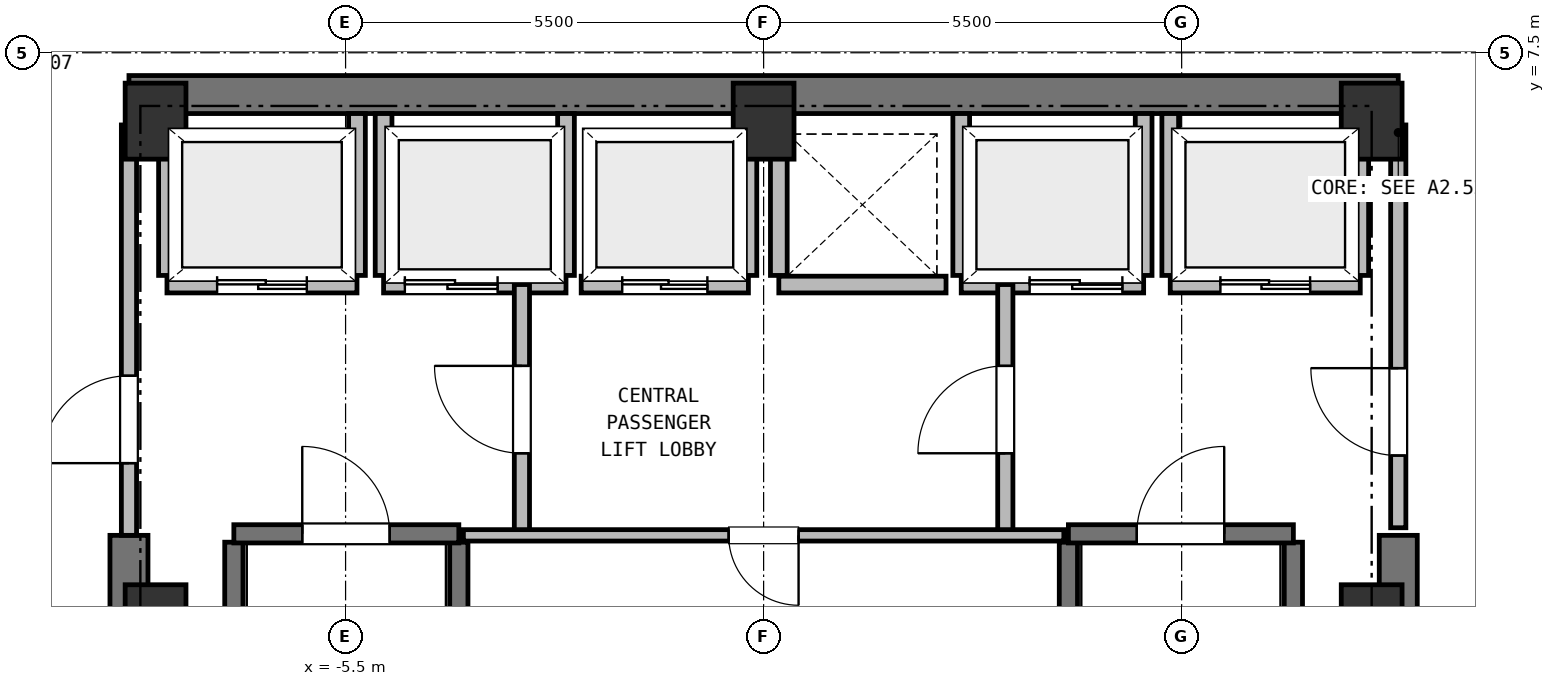
"""IFC4 building model, lengths in metres.
Left out: names, types, materials, properties, quantities, classifications, styles, units other than length and angle.
Written with IfcOpenShell. Run it as: python <this file> out.ifc"""

import sys

from ifc_helpers import new_model, si_unit, direction, frame, frame_2d, origin, origin_2d, place, context, subcontext, project, spatial, rectangle, extrude, element, fill, save


model = new_model("IFC4")
c1 = context("Model", 3, precision=1e-05, world=origin(), true_north=direction((0.0, 1.0)))
c2 = subcontext(c1, "Body", "Model", "MODEL_VIEW")
j1 = project(units=[si_unit("LENGTHUNIT", "METRE"), si_unit("PLANEANGLEUNIT", "RADIAN")], contexts=[c1])
p1 = place(None, origin())
s1 = spatial("IfcSite", under=j1, at=p1, CompositionType="ELEMENT")
p2 = place(p1, origin())
s2 = spatial("IfcBuilding", under=s1, at=p2, CompositionType="ELEMENT")
p3 = place(p2, frame((0.0, 0.0, 194.15)))
s3 = spatial("IfcBuildingStorey", under=s2, at=p3, CompositionType="ELEMENT", Elevation=194.15)
for number, where, z_axis, x_axis in (
    (1, (8.0, 0.0, 0.0), (0.0, 0.0, 1.0), (1.0, 0.0, 0.0)),
    (2, (8.0, 6.6, 0.0), (0.0, 0.0, 1.0), (1.0, 0.0, 0.0)),
    (3, (0.0, 6.6, 0.0), (0.0, 0.0, 1.0), (1.0, 0.0, 0.0)),
    (4, (-8.0, 6.6, 0.0), (0.0, 0.0, 1.0), (1.0, 0.0, 0.0)),
    (5, (-8.0, 0.0, 0.0), (0.0, 0.0, 1.0), (1.0, 0.0, 0.0)),
):
    element("IfcColumn", number, at=place(p3, frame(where, z_axis=z_axis, x_axis=x_axis)), inside=s3, PredefinedType="COLUMN", context=c2, shape_type="SweptSolid", body=[
        extrude(rectangle(XDim=0.8, YDim=1.0, at=origin_2d()), origin(), (0.0, 0.0, 1.0), 3.8),
    ])
p4 = place(p3, frame((-8.35, 6.95, 0.0), z_axis=(0.0, 0.0, 1.0), x_axis=(1.0, 0.0, 0.0)))
e6 = element("IfcWall", 6, at=p4, inside=s3, PredefinedType="SHEAR", context=c2, shape_type="SweptSolid", body=[
    extrude(rectangle(XDim=16.7, YDim=0.5, at=frame_2d((8.35, 0.0))), origin(), (0.0, 0.0, 1.0), 3.55),
])
for number, where, z_axis, x_axis in (
    (7, (-8.35, -6.95, 0.0), (0.0, 0.0, 1.0), (0.0, 1.0, 0.0)),
    (8, (8.35, -6.95, 0.0), (0.0, 0.0, 1.0), (0.0, 1.0, 0.0)),
):
    element("IfcWall", number, at=place(p3, frame(where, z_axis=z_axis, x_axis=x_axis)), inside=s3, PredefinedType="SHEAR", context=c2, shape_type="SweptSolid", body=[
        extrude(rectangle(XDim=8.1, YDim=0.5, at=frame_2d((4.05, 0.0))), origin(), (0.0, 0.0, 1.0), 3.55),
    ])
for number, where, z_axis, x_axis in (
    (9, (-6.97, -6.16, 0.0), (0.0, 0.0, 1.0), (0.0, 1.0, 0.0)),
    (10, (-4.01, -6.16, 0.0), (0.0, 0.0, 1.0), (0.0, 1.0, 0.0)),
):
    element("IfcWall", number, at=place(p3, frame(where, z_axis=z_axis, x_axis=x_axis)), inside=s3, PredefinedType="SHEAR", context=c2, shape_type="SweptSolid", body=[
        extrude(rectangle(XDim=7.22, YDim=0.24, at=frame_2d((3.61, 0.0))), origin(), (0.0, 0.0, 1.0), 3.55),
    ])
p5 = place(p3, frame((-6.97, 1.17, 0.0), z_axis=(0.0, 0.0, 1.0), x_axis=(1.0, 0.0, 0.0)))
e11 = element("IfcWall", 11, at=p5, inside=s3, PredefinedType="SHEAR", context=c2, shape_type="SweptSolid", body=[
    extrude(rectangle(XDim=2.96, YDim=0.24, at=frame_2d((1.48, 0.0))), origin(), (0.0, 0.0, 1.0), 3.55),
])
p6 = place(p5, frame((0.9, 0.0, 0.0)))
e12 = element("IfcOpeningElement", 12, at=p6, cuts=e11, PredefinedType="OPENING", context=c2, shape_type="SweptSolid", body=[
    extrude(rectangle(XDim=1.15, YDim=2.15, at=frame_2d((0.575, 1.075))), frame((0.0, 0.13, 0.0), z_axis=(0.0, -1.0, 0.0), x_axis=(1.0, 0.0, 0.0)), (0.0, 0.0, 1.0), 0.26),
])
for number, where, z_axis, x_axis in (
    (13, (4.01, -6.16, 0.0), (0.0, 0.0, 1.0), (0.0, 1.0, 0.0)),
    (14, (6.97, -6.16, 0.0), (0.0, 0.0, 1.0), (0.0, 1.0, 0.0)),
):
    element("IfcWall", number, at=place(p3, frame(where, z_axis=z_axis, x_axis=x_axis)), inside=s3, PredefinedType="SHEAR", context=c2, shape_type="SweptSolid", body=[
        extrude(rectangle(XDim=7.22, YDim=0.24, at=frame_2d((3.61, 0.0))), origin(), (0.0, 0.0, 1.0), 3.55),
    ])
p7 = place(p3, frame((4.01, 1.17, 0.0), z_axis=(0.0, 0.0, 1.0), x_axis=(1.0, 0.0, 0.0)))
e15 = element("IfcWall", 15, at=p7, inside=s3, PredefinedType="SHEAR", context=c2, shape_type="SweptSolid", body=[
    extrude(rectangle(XDim=2.96, YDim=0.24, at=frame_2d((1.48, 0.0))), origin(), (0.0, 0.0, 1.0), 3.55),
])
p8 = place(p7, frame((0.9, 0.0, 0.0)))
e16 = element("IfcOpeningElement", 16, at=p8, cuts=e15, PredefinedType="OPENING", context=c2, shape_type="SweptSolid", body=[
    extrude(rectangle(XDim=1.15, YDim=2.15, at=frame_2d((0.575, 1.075))), frame((0.0, 0.13, 0.0), z_axis=(0.0, -1.0, 0.0), x_axis=(1.0, 0.0, 0.0)), (0.0, 0.0, 1.0), 0.26),
])
p9 = place(p3, frame((-7.85, 4.45, 0.0), z_axis=(0.0, 0.0, 1.0), x_axis=(1.0, 0.0, 0.0)))
e17 = element("IfcWall", 17, at=p9, inside=s3, PredefinedType="PARTITIONING", context=c2, shape_type="SweptSolid", body=[
    extrude(rectangle(XDim=2.5, YDim=0.22, at=frame_2d((1.25, 0.0))), origin(), (0.0, 0.0, 1.0), 3.55),
])
p10 = place(p9, frame((0.66, 0.0, 0.0)))
e18 = element("IfcOpeningElement", 18, at=p10, cuts=e17, PredefinedType="OPENING", context=c2, shape_type="SweptSolid", body=[
    extrude(rectangle(XDim=1.18, YDim=2.15, at=frame_2d((0.59, 1.075))), frame((0.0, 0.12, 0.0), z_axis=(0.0, -1.0, 0.0), x_axis=(1.0, 0.0, 0.0)), (0.0, 0.0, 1.0), 0.24),
])
p11 = place(p3, frame((-7.85, 4.57, 0.0), z_axis=(0.0, 0.0, 1.0), x_axis=(0.0, 1.0, 0.0)))
e19 = element("IfcWall", 19, at=p11, inside=s3, PredefinedType="PARTITIONING", context=c2, shape_type="SweptSolid", body=[
    extrude(rectangle(XDim=2.13, YDim=0.22, at=frame_2d((1.065, 0.0))), origin(), (0.0, 0.0, 1.0), 3.18),
])
p12 = place(p3, frame((-5.35, 4.57, 0.0), z_axis=(0.0, 0.0, 1.0), x_axis=(0.0, 1.0, 0.0)))
e20 = element("IfcWall", 20, at=p12, inside=s3, PredefinedType="PARTITIONING", context=c2, shape_type="SweptSolid", body=[
    extrude(rectangle(XDim=2.13, YDim=0.22, at=frame_2d((1.065, 0.0))), origin(), (0.0, 0.0, 1.0), 3.55),
])
p13 = place(p3, frame((5.35, 4.45, 0.0), z_axis=(0.0, 0.0, 1.0), x_axis=(1.0, 0.0, 0.0)))
e21 = element("IfcWall", 21, at=p13, inside=s3, PredefinedType="PARTITIONING", context=c2, shape_type="SweptSolid", body=[
    extrude(rectangle(XDim=2.5, YDim=0.22, at=frame_2d((1.25, 0.0))), origin(), (0.0, 0.0, 1.0), 3.55),
])
p14 = place(p13, frame((0.66, 0.0, 0.0)))
e22 = element("IfcOpeningElement", 22, at=p14, cuts=e21, PredefinedType="OPENING", context=c2, shape_type="SweptSolid", body=[
    extrude(rectangle(XDim=1.18, YDim=2.15, at=frame_2d((0.59, 1.075))), frame((0.0, 0.12, 0.0), z_axis=(0.0, -1.0, 0.0), x_axis=(1.0, 0.0, 0.0)), (0.0, 0.0, 1.0), 0.24),
])
p15 = place(p3, frame((5.35, 4.57, 0.0), z_axis=(0.0, 0.0, 1.0), x_axis=(0.0, 1.0, 0.0)))
e23 = element("IfcWall", 23, at=p15, inside=s3, PredefinedType="PARTITIONING", context=c2, shape_type="SweptSolid", body=[
    extrude(rectangle(XDim=2.13, YDim=0.22, at=frame_2d((1.065, 0.0))), origin(), (0.0, 0.0, 1.0), 3.55),
])
p16 = place(p3, frame((7.85, 4.57, 0.0), z_axis=(0.0, 0.0, 1.0), x_axis=(0.0, 1.0, 0.0)))
e24 = element("IfcWall", 24, at=p16, inside=s3, PredefinedType="PARTITIONING", context=c2, shape_type="SweptSolid", body=[
    extrude(rectangle(XDim=2.13, YDim=0.22, at=frame_2d((1.065, 0.0))), origin(), (0.0, 0.0, 1.0), 3.18),
])
p17 = place(p3, frame((-5.0, 4.45, 0.0), z_axis=(0.0, 0.0, 1.0), x_axis=(1.0, 0.0, 0.0)))
e25 = element("IfcWall", 25, at=p17, inside=s3, PredefinedType="PARTITIONING", context=c2, shape_type="SweptSolid", body=[
    extrude(rectangle(XDim=2.4, YDim=0.22, at=frame_2d((1.2, 0.0))), origin(), (0.0, 0.0, 1.0), 3.55),
])
p18 = place(p17, frame((0.28, 0.0, 0.0)))
e26 = element("IfcOpeningElement", 26, at=p18, cuts=e25, PredefinedType="OPENING", context=c2, shape_type="SweptSolid", body=[
    extrude(rectangle(XDim=1.22, YDim=2.15, at=frame_2d((0.61, 1.075))), frame((0.0, 0.12, 0.0), z_axis=(0.0, -1.0, 0.0), x_axis=(1.0, 0.0, 0.0)), (0.0, 0.0, 1.0), 0.24),
])
for number, where, z_axis, x_axis in (
    (27, (-5.0, 4.57, 0.0), (0.0, 0.0, 1.0), (0.0, 1.0, 0.0)),
    (28, (-2.6, 4.57, 0.0), (0.0, 0.0, 1.0), (0.0, 1.0, 0.0)),
):
    element("IfcWall", number, at=place(p3, frame(where, z_axis=z_axis, x_axis=x_axis)), inside=s3, PredefinedType="PARTITIONING", context=c2, shape_type="SweptSolid", body=[
        extrude(rectangle(XDim=2.13, YDim=0.22, at=frame_2d((1.065, 0.0))), origin(), (0.0, 0.0, 1.0), 3.55),
    ])
p19 = place(p3, frame((2.6, 4.45, 0.0), z_axis=(0.0, 0.0, 1.0), x_axis=(1.0, 0.0, 0.0)))
e29 = element("IfcWall", 29, at=p19, inside=s3, PredefinedType="PARTITIONING", context=c2, shape_type="SweptSolid", body=[
    extrude(rectangle(XDim=2.4, YDim=0.22, at=frame_2d((1.2, 0.0))), origin(), (0.0, 0.0, 1.0), 3.55),
])
p20 = place(p19, frame((0.9, 0.0, 0.0)))
e30 = element("IfcOpeningElement", 30, at=p20, cuts=e29, PredefinedType="OPENING", context=c2, shape_type="SweptSolid", body=[
    extrude(rectangle(XDim=1.22, YDim=2.15, at=frame_2d((0.61, 1.075))), frame((0.0, 0.12, 0.0), z_axis=(0.0, -1.0, 0.0), x_axis=(1.0, 0.0, 0.0)), (0.0, 0.0, 1.0), 0.24),
])
for number, where, z_axis, x_axis in (
    (31, (2.6, 4.57, 0.0), (0.0, 0.0, 1.0), (0.0, 1.0, 0.0)),
    (32, (5.0, 4.57, 0.0), (0.0, 0.0, 1.0), (0.0, 1.0, 0.0)),
):
    element("IfcWall", number, at=place(p3, frame(where, z_axis=z_axis, x_axis=x_axis)), inside=s3, PredefinedType="PARTITIONING", context=c2, shape_type="SweptSolid", body=[
        extrude(rectangle(XDim=2.13, YDim=0.22, at=frame_2d((1.065, 0.0))), origin(), (0.0, 0.0, 1.0), 3.55),
    ])
p21 = place(p3, frame((-2.4, 4.45, 0.0), z_axis=(0.0, 0.0, 1.0), x_axis=(1.0, 0.0, 0.0)))
e33 = element("IfcWall", 33, at=p21, inside=s3, PredefinedType="PARTITIONING", context=c2, shape_type="SweptSolid", body=[
    extrude(rectangle(XDim=2.2, YDim=0.22, at=frame_2d((1.1, 0.0))), origin(), (0.0, 0.0, 1.0), 3.55),
])
p22 = place(p21, frame((0.54, 0.0, 0.0)))
e34 = element("IfcOpeningElement", 34, at=p22, cuts=e33, PredefinedType="OPENING", context=c2, shape_type="SweptSolid", body=[
    extrude(rectangle(XDim=1.12, YDim=2.15, at=frame_2d((0.56, 1.075))), frame((0.0, 0.12, 0.0), z_axis=(0.0, -1.0, 0.0), x_axis=(1.0, 0.0, 0.0)), (0.0, 0.0, 1.0), 0.24),
])
p23 = place(p3, frame((-0.2, 4.57, 0.0), z_axis=(0.0, 0.0, 1.0), x_axis=(0.0, 1.0, 0.0)))
e35 = element("IfcWall", 35, at=p23, inside=s3, PredefinedType="PARTITIONING", context=c2, shape_type="SweptSolid", body=[
    extrude(rectangle(XDim=2.13, YDim=0.22, at=frame_2d((1.065, 0.0))), origin(), (0.0, 0.0, 1.0), 3.55),
])
p24 = place(p3, frame((0.2, 4.45, 0.0), z_axis=(0.0, 0.0, 1.0), x_axis=(1.0, 0.0, 0.0)))
e36 = element("IfcWall", 36, at=p24, inside=s3, PredefinedType="PARTITIONING", context=c2, shape_type="SweptSolid", body=[
    extrude(rectangle(XDim=2.2, YDim=0.22, at=frame_2d((1.1, 0.0))), origin(), (0.0, 0.0, 1.0), 3.55),
])
p25 = place(p3, frame((0.2, 4.57, 0.0), z_axis=(0.0, 0.0, 1.0), x_axis=(0.0, 1.0, 0.0)))
e37 = element("IfcWall", 37, at=p25, inside=s3, PredefinedType="PARTITIONING", context=c2, shape_type="SweptSolid", body=[
    extrude(rectangle(XDim=2.13, YDim=0.22, at=frame_2d((1.065, 0.0))), origin(), (0.0, 0.0, 1.0), 3.55),
])
p26 = place(p3, frame((-3.18, 1.15, 0.0), z_axis=(0.0, 0.0, 1.0), x_axis=(0.0, 1.0, 0.0)))
e38 = element("IfcWall", 38, at=p26, inside=s3, PredefinedType="PARTITIONING", context=c2, shape_type="SweptSolid", body=[
    extrude(rectangle(XDim=3.3, YDim=0.2, at=frame_2d((1.65, 0.0))), origin(), (0.0, 0.0, 1.0), 3.55),
])
p27 = place(p26, frame((1.08, 0.0, 0.0)))
e39 = element("IfcOpeningElement", 39, at=p27, cuts=e38, PredefinedType="OPENING", context=c2, shape_type="SweptSolid", body=[
    extrude(rectangle(XDim=1.15, YDim=2.15, at=frame_2d((0.575, 1.075))), frame((0.0, 0.11, 0.0), z_axis=(0.0, -1.0, 0.0), x_axis=(1.0, 0.0, 0.0)), (0.0, 0.0, 1.0), 0.22),
])
p28 = place(p3, frame((3.18, 1.15, 0.0), z_axis=(0.0, 0.0, 1.0), x_axis=(0.0, 1.0, 0.0)))
e40 = element("IfcWall", 40, at=p28, inside=s3, PredefinedType="PARTITIONING", context=c2, shape_type="SweptSolid", body=[
    extrude(rectangle(XDim=3.3, YDim=0.2, at=frame_2d((1.65, 0.0))), origin(), (0.0, 0.0, 1.0), 3.55),
])
p29 = place(p28, frame((1.08, 0.0, 0.0)))
e41 = element("IfcOpeningElement", 41, at=p29, cuts=e40, PredefinedType="OPENING", context=c2, shape_type="SweptSolid", body=[
    extrude(rectangle(XDim=1.15, YDim=2.15, at=frame_2d((0.575, 1.075))), frame((0.0, 0.11, 0.0), z_axis=(0.0, -1.0, 0.0), x_axis=(1.0, 0.0, 0.0)), (0.0, 0.0, 1.0), 0.22),
])
p30 = place(p3, frame((-8.35, 1.15, 0.0), z_axis=(0.0, 0.0, 1.0), x_axis=(0.0, 1.0, 0.0)))
e42 = element("IfcWall", 42, at=p30, inside=s3, PredefinedType="PARTITIONING", context=c2, shape_type="SweptSolid", body=[
    extrude(rectangle(XDim=5.4, YDim=0.2, at=frame_2d((2.7, 0.0))), origin(), (0.0, 0.0, 1.0), 3.55),
])
p31 = place(p30, frame((0.95, 0.0, 0.0)))
e43 = element("IfcOpeningElement", 43, at=p31, cuts=e42, PredefinedType="OPENING", context=c2, shape_type="SweptSolid", body=[
    extrude(rectangle(XDim=1.15, YDim=2.15, at=frame_2d((0.575, 1.075))), frame((0.0, 0.11, 0.0), z_axis=(0.0, -1.0, 0.0), x_axis=(1.0, 0.0, 0.0)), (0.0, 0.0, 1.0), 0.22),
])
p32 = place(p3, frame((8.35, 1.25, 0.0), z_axis=(0.0, 0.0, 1.0), x_axis=(0.0, 1.0, 0.0)))
e44 = element("IfcWall", 44, at=p32, inside=s3, PredefinedType="PARTITIONING", context=c2, shape_type="SweptSolid", body=[
    extrude(rectangle(XDim=5.3, YDim=0.2, at=frame_2d((2.65, 0.0))), origin(), (0.0, 0.0, 1.0), 3.55),
])
p33 = place(p32, frame((0.95, 0.0, 0.0)))
e45 = element("IfcOpeningElement", 45, at=p33, cuts=e44, PredefinedType="OPENING", context=c2, shape_type="SweptSolid", body=[
    extrude(rectangle(XDim=1.15, YDim=2.15, at=frame_2d((0.575, 1.075))), frame((0.0, 0.11, 0.0), z_axis=(0.0, -1.0, 0.0), x_axis=(1.0, 0.0, 0.0)), (0.0, 0.0, 1.0), 0.22),
])
p34 = place(p3, frame((3.95, 1.15, 0.0), z_axis=(0.0, 0.0, 1.0), x_axis=(-1.0, 0.0, 0.0)))
e46 = element("IfcWall", 46, at=p34, inside=s3, PredefinedType="PARTITIONING", context=c2, shape_type="SweptSolid", body=[
    extrude(rectangle(XDim=7.9, YDim=0.15, at=frame_2d((3.95, 0.0))), origin(), (0.0, 0.0, 1.0), 3.55),
])
p35 = place(p34, frame((3.49, 0.0, 0.0)))
e47 = element("IfcOpeningElement", 47, at=p35, cuts=e46, PredefinedType="OPENING", context=c2, shape_type="SweptSolid", body=[
    extrude(rectangle(XDim=0.92, YDim=2.05, at=frame_2d((0.46, 1.025))), frame((0.0, 0.085, 0.0), z_axis=(0.0, -1.0, 0.0), x_axis=(1.0, 0.0, 0.0)), (0.0, 0.0, 1.0), 0.17),
])
p36 = place(p3, frame((8.648, 9.171, 0.0), z_axis=(0.0, 0.0, 1.0), x_axis=(0.689960858356, -0.723846678473, 0.0)))
e48 = element("IfcWall", 48, at=p36, inside=s3, PredefinedType="PARTITIONING", context=c2, shape_type="SweptSolid", body=[
    extrude(rectangle(XDim=2.572, YDim=0.15, at=frame_2d((1.286, 0.0))), origin(), (0.0, 0.0, 1.0), 3.55),
])
p37 = place(p3, frame((-10.422, 7.309, 0.0), z_axis=(0.0, 0.0, 1.0), x_axis=(0.689960858356, 0.723846678473, 0.0)))
e49 = element("IfcWall", 49, at=p37, inside=s3, PredefinedType="PARTITIONING", context=c2, shape_type="SweptSolid", body=[
    extrude(rectangle(XDim=2.572, YDim=0.15, at=frame_2d((1.286, 0.0))), origin(), (0.0, 0.0, 1.0), 3.55),
])
p38 = place(p37, frame((0.796, 0.0, 0.0)))
e50 = element("IfcOpeningElement", 50, at=p38, cuts=e49, PredefinedType="OPENING", context=c2, shape_type="SweptSolid", body=[
    extrude(rectangle(XDim=1.06, YDim=2.15, at=frame_2d((0.53, 1.075))), frame((0.0, 0.085, 0.0), z_axis=(0.0, -1.0, 0.0), x_axis=(1.0, 0.0, 0.0)), (0.0, 0.0, 1.0), 0.17),
])
p39 = place(p6, origin())
e51 = element("IfcDoor", 51, at=p39, inside=s3, OperationType="SINGLE_SWING_LEFT", PredefinedType="DOOR", context=c2, shape_type="SweptSolid", body=[
    extrude(rectangle(XDim=1.15, YDim=2.15, at=frame_2d((0.575, 1.075))), frame((0.0, 0.025, 0.0), z_axis=(0.0, -1.0, 0.0), x_axis=(1.0, 0.0, 0.0)), (0.0, 0.0, 1.0), 0.05),
])
fill(e12, e51)
p40 = place(p8, origin())
e52 = element("IfcDoor", 52, at=p40, inside=s3, OperationType="SINGLE_SWING_RIGHT", PredefinedType="DOOR", context=c2, shape_type="SweptSolid", body=[
    extrude(rectangle(XDim=1.15, YDim=2.15, at=frame_2d((0.575, 1.075))), frame((0.0, 0.025, 0.0), z_axis=(0.0, -1.0, 0.0), x_axis=(1.0, 0.0, 0.0)), (0.0, 0.0, 1.0), 0.05),
])
fill(e16, e52)
p41 = place(p10, origin())
e53 = element("IfcDoor", 53, at=p41, inside=s3, OperationType="DOUBLE_DOOR_SLIDING", PredefinedType="DOOR", context=c2, shape_type="SweptSolid", body=[
    extrude(rectangle(XDim=1.18, YDim=2.15, at=frame_2d((0.59, 1.075))), frame((0.0, 0.025, 0.0), z_axis=(0.0, -1.0, 0.0), x_axis=(1.0, 0.0, 0.0)), (0.0, 0.0, 1.0), 0.05),
])
fill(e18, e53)
p42 = place(p14, origin())
e54 = element("IfcDoor", 54, at=p42, inside=s3, OperationType="DOUBLE_DOOR_SLIDING", PredefinedType="DOOR", context=c2, shape_type="SweptSolid", body=[
    extrude(rectangle(XDim=1.18, YDim=2.15, at=frame_2d((0.59, 1.075))), frame((0.0, 0.025, 0.0), z_axis=(0.0, -1.0, 0.0), x_axis=(1.0, 0.0, 0.0)), (0.0, 0.0, 1.0), 0.05),
])
fill(e22, e54)
p43 = place(p18, origin())
e55 = element("IfcDoor", 55, at=p43, inside=s3, OperationType="DOUBLE_DOOR_SLIDING", PredefinedType="DOOR", context=c2, shape_type="SweptSolid", body=[
    extrude(rectangle(XDim=1.22, YDim=2.15, at=frame_2d((0.61, 1.075))), frame((0.0, 0.025, 0.0), z_axis=(0.0, -1.0, 0.0), x_axis=(1.0, 0.0, 0.0)), (0.0, 0.0, 1.0), 0.05),
])
fill(e26, e55)
p44 = place(p20, origin())
e56 = element("IfcDoor", 56, at=p44, inside=s3, OperationType="DOUBLE_DOOR_SLIDING", PredefinedType="DOOR", context=c2, shape_type="SweptSolid", body=[
    extrude(rectangle(XDim=1.22, YDim=2.15, at=frame_2d((0.61, 1.075))), frame((0.0, 0.025, 0.0), z_axis=(0.0, -1.0, 0.0), x_axis=(1.0, 0.0, 0.0)), (0.0, 0.0, 1.0), 0.05),
])
fill(e30, e56)
p45 = place(p22, origin())
e57 = element("IfcDoor", 57, at=p45, inside=s3, OperationType="DOUBLE_DOOR_SLIDING", PredefinedType="DOOR", context=c2, shape_type="SweptSolid", body=[
    extrude(rectangle(XDim=1.12, YDim=2.15, at=frame_2d((0.56, 1.075))), frame((0.0, 0.025, 0.0), z_axis=(0.0, -1.0, 0.0), x_axis=(1.0, 0.0, 0.0)), (0.0, 0.0, 1.0), 0.05),
])
fill(e34, e57)
p46 = place(p27, origin())
e58 = element("IfcDoor", 58, at=p46, inside=s3, OperationType="SINGLE_SWING_RIGHT", PredefinedType="DOOR", context=c2, shape_type="SweptSolid", body=[
    extrude(rectangle(XDim=1.15, YDim=2.15, at=frame_2d((0.575, 1.075))), frame((0.0, 0.025, 0.0), z_axis=(0.0, -1.0, 0.0), x_axis=(1.0, 0.0, 0.0)), (0.0, 0.0, 1.0), 0.05),
])
fill(e39, e58)
p47 = place(p29, origin())
e59 = element("IfcDoor", 59, at=p47, inside=s3, OperationType="SINGLE_SWING_LEFT", PredefinedType="DOOR", context=c2, shape_type="SweptSolid", body=[
    extrude(rectangle(XDim=1.15, YDim=2.15, at=frame_2d((0.575, 1.075))), frame((0.0, 0.025, 0.0), z_axis=(0.0, -1.0, 0.0), x_axis=(1.0, 0.0, 0.0)), (0.0, 0.0, 1.0), 0.05),
])
fill(e41, e59)
p48 = place(p31, origin())
e60 = element("IfcDoor", 60, at=p48, inside=s3, OperationType="SINGLE_SWING_LEFT", PredefinedType="DOOR", context=c2, shape_type="SweptSolid", body=[
    extrude(rectangle(XDim=1.15, YDim=2.15, at=frame_2d((0.575, 1.075))), frame((0.0, 0.025, 0.0), z_axis=(0.0, -1.0, 0.0), x_axis=(1.0, 0.0, 0.0)), (0.0, 0.0, 1.0), 0.05),
])
fill(e43, e60)
p49 = place(p33, origin())
e61 = element("IfcDoor", 61, at=p49, inside=s3, OperationType="SINGLE_SWING_RIGHT", PredefinedType="DOOR", context=c2, shape_type="SweptSolid", body=[
    extrude(rectangle(XDim=1.15, YDim=2.15, at=frame_2d((0.575, 1.075))), frame((0.0, 0.025, 0.0), z_axis=(0.0, -1.0, 0.0), x_axis=(1.0, 0.0, 0.0)), (0.0, 0.0, 1.0), 0.05),
])
fill(e45, e61)
p50 = place(p35, origin())
e62 = element("IfcDoor", 62, at=p50, inside=s3, OperationType="SINGLE_SWING_LEFT", PredefinedType="DOOR", context=c2, shape_type="SweptSolid", body=[
    extrude(rectangle(XDim=0.92, YDim=2.05, at=frame_2d((0.46, 1.025))), frame((0.0, 0.025, 0.0), z_axis=(0.0, -1.0, 0.0), x_axis=(1.0, 0.0, 0.0)), (0.0, 0.0, 1.0), 0.05),
])
fill(e47, e62)
save(model, sys.argv[1])
